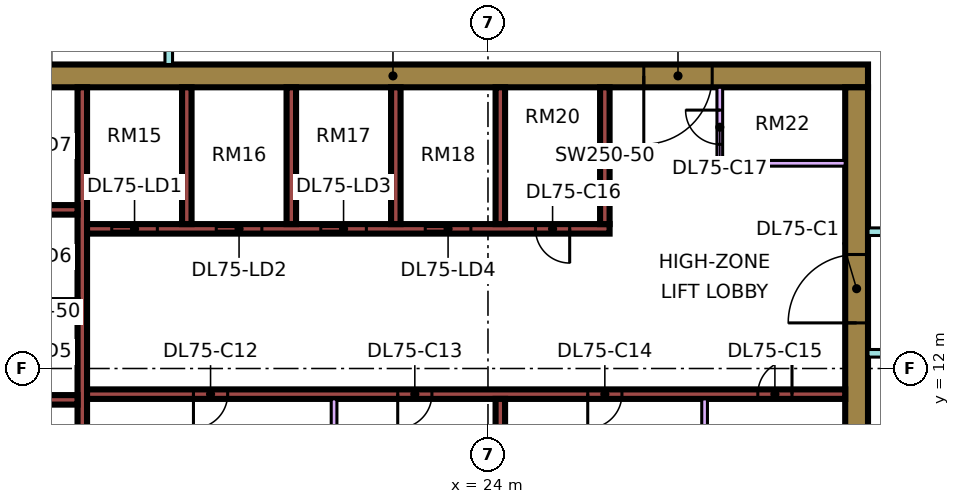
"""IFC4 building model, lengths in metres.
Left out: names, types, materials, properties, quantities, classifications, styles, units other than length and angle.
Written with IfcOpenShell. Run it as: python <this file> out.ifc"""

import sys

from ifc_helpers import new_model, si_unit, direction, frame, frame_2d, origin, place, context, subcontext, project, spatial, rectangle, extrude, element, fill, save


model = new_model("IFC4")
c1 = context("Model", 3, precision=1e-05, world=origin(), true_north=direction((0.0, 1.0)))
c2 = subcontext(c1, "Body", "Model", "MODEL_VIEW")
j1 = project(units=[si_unit("LENGTHUNIT", "METRE"), si_unit("PLANEANGLEUNIT", "RADIAN")], contexts=[c1])
p1 = place(None, origin())
s1 = spatial("IfcSite", under=j1, at=p1, CompositionType="ELEMENT")
p2 = place(p1, origin())
s2 = spatial("IfcBuilding", under=s1, at=p2, CompositionType="ELEMENT")
p3 = place(p2, frame((0.0, 0.0, 318.4)))
s3 = spatial("IfcBuildingStorey", under=s2, at=p3, CompositionType="ELEMENT", Elevation=318.4)
p4 = place(p3, frame((9.0, 19.7, 0.0), z_axis=(0.0, 0.0, 1.0), x_axis=(1.0, 0.0, 0.0)))
e1 = element("IfcWall", 1, at=p4, inside=s3, PredefinedType="SHEAR", context=c2, shape_type="SweptSolid", body=[
    extrude(rectangle(XDim=25.0, YDim=0.6, at=frame_2d((12.5, 0.0))), origin(), (0.0, 0.0, 1.0), 3.75),
])
p5 = place(p4, frame((19.1, 0.0, 0.0)))
e2 = element("IfcOpeningElement", 2, at=p5, cuts=e1, PredefinedType="OPENING", context=c2, shape_type="SweptSolid", body=[
    extrude(rectangle(XDim=1.8, YDim=2.4, at=frame_2d((0.9, 1.2))), frame((0.0, 0.31, 0.0), z_axis=(0.0, -1.0, 0.0), x_axis=(1.0, 0.0, 0.0)), (0.0, 0.0, 1.0), 0.62),
])
p6 = place(p3, frame((33.7, 7.6, 0.0), z_axis=(0.0, 0.0, 1.0), x_axis=(0.0, 1.0, 0.0)))
e3 = element("IfcWall", 3, at=p6, inside=s3, PredefinedType="SHEAR", context=c2, shape_type="SweptSolid", body=[
    extrude(rectangle(XDim=11.8, YDim=0.6, at=frame_2d((5.9, 0.0))), origin(), (0.0, 0.0, 1.0), 3.75),
])
p7 = place(p6, frame((5.6, 0.0, 0.0)))
e4 = element("IfcOpeningElement", 4, at=p7, cuts=e3, PredefinedType="OPENING", context=c2, shape_type="SweptSolid", body=[
    extrude(rectangle(XDim=1.8, YDim=2.4, at=frame_2d((0.9, 1.2))), frame((0.0, 0.31, 0.0), z_axis=(0.0, -1.0, 0.0), x_axis=(1.0, 0.0, 0.0)), (0.0, 0.0, 1.0), 0.62),
])
p8 = place(p3, frame((13.325, 7.6, 0.0), z_axis=(0.0, 0.0, 1.0), x_axis=(0.0, 1.0, 0.0)))
e5 = element("IfcWall", 5, at=p8, inside=s3, PredefinedType="SHEAR", context=c2, shape_type="SweptSolid", body=[
    extrude(rectangle(XDim=11.8, YDim=0.25, at=frame_2d((5.9, 0.0))), origin(), (0.0, 0.0, 1.0), 3.75),
])
p9 = place(p3, frame((13.45, 11.325, 0.0), z_axis=(0.0, 0.0, 1.0), x_axis=(1.0, 0.0, 0.0)))
e6 = element("IfcWall", 6, at=p9, inside=s3, PredefinedType="SHEAR", context=c2, shape_type="SweptSolid", body=[
    extrude(rectangle(XDim=19.95, YDim=0.25, at=frame_2d((9.975, 0.0))), origin(), (0.0, 0.0, 1.0), 3.75),
])
p10 = place(p9, frame((2.8, 0.0, 0.0)))
e7 = element("IfcOpeningElement", 7, at=p10, cuts=e6, PredefinedType="OPENING", context=c2, shape_type="SweptSolid", body=[
    extrude(rectangle(XDim=0.9, YDim=2.1, at=frame_2d((0.45, 1.05))), frame((0.0, 0.135, 0.0), z_axis=(0.0, -1.0, 0.0), x_axis=(1.0, 0.0, 0.0)), (0.0, 0.0, 1.0), 0.27),
])
p11 = place(p9, frame((8.175, 0.0, 0.0)))
e8 = element("IfcOpeningElement", 8, at=p11, cuts=e6, PredefinedType="OPENING", context=c2, shape_type="SweptSolid", body=[
    extrude(rectangle(XDim=0.9, YDim=2.1, at=frame_2d((0.45, 1.05))), frame((0.0, 0.135, 0.0), z_axis=(0.0, -1.0, 0.0), x_axis=(1.0, 0.0, 0.0)), (0.0, 0.0, 1.0), 0.27),
])
p12 = place(p9, frame((13.175, 0.0, 0.0)))
e9 = element("IfcOpeningElement", 9, at=p12, cuts=e6, PredefinedType="OPENING", context=c2, shape_type="SweptSolid", body=[
    extrude(rectangle(XDim=0.9, YDim=2.1, at=frame_2d((0.45, 1.05))), frame((0.0, 0.135, 0.0), z_axis=(0.0, -1.0, 0.0), x_axis=(1.0, 0.0, 0.0)), (0.0, 0.0, 1.0), 0.27),
])
p13 = place(p9, frame((17.65, 0.0, 0.0)))
e10 = element("IfcOpeningElement", 10, at=p13, cuts=e6, PredefinedType="OPENING", context=c2, shape_type="SweptSolid", body=[
    extrude(rectangle(XDim=0.9, YDim=2.1, at=frame_2d((0.45, 1.05))), frame((0.0, 0.135, 0.0), z_axis=(0.0, -1.0, 0.0), x_axis=(1.0, 0.0, 0.0)), (0.0, 0.0, 1.0), 0.27),
])
p14 = place(p3, frame((13.45, 15.675, 0.0), z_axis=(0.0, 0.0, 1.0), x_axis=(1.0, 0.0, 0.0)))
e11 = element("IfcWall", 11, at=p14, inside=s3, PredefinedType="SHEAR", context=c2, shape_type="SweptSolid", body=[
    extrude(rectangle(XDim=13.75, YDim=0.25, at=frame_2d((6.875, 0.0))), origin(), (0.0, 0.0, 1.0), 3.75),
])
p15 = place(p14, frame((0.65, 0.0, 0.0)))
e12 = element("IfcOpeningElement", 12, at=p15, cuts=e11, PredefinedType="OPENING", context=c2, shape_type="SweptSolid", body=[
    extrude(rectangle(XDim=1.2, YDim=2.2, at=frame_2d((0.6, 1.1))), frame((0.0, 0.135, 0.0), z_axis=(0.0, -1.0, 0.0), x_axis=(1.0, 0.0, 0.0)), (0.0, 0.0, 1.0), 0.27),
])
p16 = place(p14, frame((3.4, 0.0, 0.0)))
e13 = element("IfcOpeningElement", 13, at=p16, cuts=e11, PredefinedType="OPENING", context=c2, shape_type="SweptSolid", body=[
    extrude(rectangle(XDim=1.2, YDim=2.2, at=frame_2d((0.6, 1.1))), frame((0.0, 0.135, 0.0), z_axis=(0.0, -1.0, 0.0), x_axis=(1.0, 0.0, 0.0)), (0.0, 0.0, 1.0), 0.27),
])
p17 = place(p14, frame((6.15, 0.0, 0.0)))
e14 = element("IfcOpeningElement", 14, at=p17, cuts=e11, PredefinedType="OPENING", context=c2, shape_type="SweptSolid", body=[
    extrude(rectangle(XDim=1.2, YDim=2.2, at=frame_2d((0.6, 1.1))), frame((0.0, 0.135, 0.0), z_axis=(0.0, -1.0, 0.0), x_axis=(1.0, 0.0, 0.0)), (0.0, 0.0, 1.0), 0.27),
])
p18 = place(p14, frame((8.9, 0.0, 0.0)))
e15 = element("IfcOpeningElement", 15, at=p18, cuts=e11, PredefinedType="OPENING", context=c2, shape_type="SweptSolid", body=[
    extrude(rectangle(XDim=1.2, YDim=2.2, at=frame_2d((0.6, 1.1))), frame((0.0, 0.135, 0.0), z_axis=(0.0, -1.0, 0.0), x_axis=(1.0, 0.0, 0.0)), (0.0, 0.0, 1.0), 0.27),
])
p19 = place(p14, frame((11.8, 0.0, 0.0)))
e16 = element("IfcOpeningElement", 16, at=p19, cuts=e11, PredefinedType="OPENING", context=c2, shape_type="SweptSolid", body=[
    extrude(rectangle(XDim=0.9, YDim=2.1, at=frame_2d((0.45, 1.05))), frame((0.0, 0.135, 0.0), z_axis=(0.0, -1.0, 0.0), x_axis=(1.0, 0.0, 0.0)), (0.0, 0.0, 1.0), 0.27),
])
for number, where, z_axis, x_axis in (
    (17, (10.2, 11.175, 0.0), (0.0, 0.0, 1.0), (1.0, 0.0, 0.0)),
    (18, (10.2, 13.675, 0.0), (0.0, 0.0, 1.0), (1.0, 0.0, 0.0)),
    (19, (10.2, 16.175, 0.0), (0.0, 0.0, 1.0), (1.0, 0.0, 0.0)),
):
    element("IfcWall", number, at=place(p3, frame(where, z_axis=z_axis, x_axis=x_axis)), inside=s3, PredefinedType="SHEAR", context=c2, shape_type="SweptSolid", body=[
        extrude(rectangle(XDim=3.0, YDim=0.25, at=frame_2d((1.5, 0.0))), origin(), (0.0, 0.0, 1.0), 3.75),
    ])
for number, where, z_axis, x_axis in (
    (20, (24.325, 7.6, 0.0), (0.0, 0.0, 1.0), (0.0, 1.0, 0.0)),
    (21, (16.075, 15.8, 0.0), (0.0, 0.0, 1.0), (0.0, 1.0, 0.0)),
    (22, (18.825, 15.8, 0.0), (0.0, 0.0, 1.0), (0.0, 1.0, 0.0)),
    (23, (21.575, 15.8, 0.0), (0.0, 0.0, 1.0), (0.0, 1.0, 0.0)),
    (24, (24.325, 15.8, 0.0), (0.0, 0.0, 1.0), (0.0, 1.0, 0.0)),
    (25, (27.075, 15.8, 0.0), (0.0, 0.0, 1.0), (0.0, 1.0, 0.0)),
):
    element("IfcWall", number, at=place(p3, frame(where, z_axis=z_axis, x_axis=x_axis)), inside=s3, PredefinedType="SHEAR", context=c2, shape_type="SweptSolid", body=[
        extrude(rectangle(XDim=3.6, YDim=0.25, at=frame_2d((1.8, 0.0))), origin(), (0.0, 0.0, 1.0), 3.75),
    ])
p20 = place(p3, frame((-1.447, 12.553, 0.0), z_axis=(0.0, 0.0, 1.0), x_axis=(0.707106781187, -0.707106781187, 0.0)))
e26 = element("IfcWall", 26, at=p20, inside=s3, PredefinedType="SOLIDWALL", context=c2, shape_type="SweptSolid", body=[
    extrude(rectangle(XDim=19.799, YDim=0.15, at=frame_2d((9.899, 0.0))), origin(), (0.0, 0.0, 1.0), 3.3),
])
p21 = place(p20, frame((2.212, 0.0, 0.45)))
e27 = element("IfcOpeningElement", 27, at=p21, cuts=e26, PredefinedType="OPENING", context=c2, shape_type="SweptSolid", body=[
    extrude(rectangle(XDim=3.0, YDim=2.4, at=frame_2d((1.5, 1.2))), frame((0.0, 0.085, 0.0), z_axis=(0.0, -1.0, 0.0), x_axis=(1.0, 0.0, 0.0)), (0.0, 0.0, 1.0), 0.17),
])
p22 = place(p20, frame((10.216, 0.0, 0.45)))
e28 = element("IfcOpeningElement", 28, at=p22, cuts=e26, PredefinedType="OPENING", context=c2, shape_type="SweptSolid", body=[
    extrude(rectangle(XDim=3.0, YDim=2.4, at=frame_2d((1.5, 1.2))), frame((0.0, 0.085, 0.0), z_axis=(0.0, -1.0, 0.0), x_axis=(1.0, 0.0, 0.0)), (0.0, 0.0, 1.0), 0.17),
])
for number, where, z_axis, x_axis in (
    (29, (19.95, 7.6, 0.0), (0.0, 0.0, 1.0), (0.0, 1.0, 0.0)),
    (30, (29.7, 7.6, 0.0), (0.0, 0.0, 1.0), (0.0, 1.0, 0.0)),
):
    element("IfcWall", number, at=place(p3, frame(where, z_axis=z_axis, x_axis=x_axis)), inside=s3, PredefinedType="PARTITIONING", context=c2, shape_type="SweptSolid", body=[
        extrude(rectangle(XDim=3.6, YDim=0.15, at=frame_2d((1.8, 0.0))), origin(), (0.0, 0.0, 1.0), 3.3),
    ])
p23 = place(p3, frame((30.1, 17.4, 0.0), z_axis=(0.0, 0.0, 1.0), x_axis=(0.0, 1.0, 0.0)))
e31 = element("IfcWall", 31, at=p23, inside=s3, PredefinedType="PARTITIONING", context=c2, shape_type="SweptSolid", body=[
    extrude(rectangle(XDim=2.0, YDim=0.15, at=frame_2d((1.0, 0.0))), origin(), (0.0, 0.0, 1.0), 3.3),
])
p24 = place(p23, frame((0.5, 0.0, 0.0)))
e32 = element("IfcOpeningElement", 32, at=p24, cuts=e31, PredefinedType="OPENING", context=c2, shape_type="SweptSolid", body=[
    extrude(rectangle(XDim=0.9, YDim=2.1, at=frame_2d((0.45, 1.05))), frame((0.0, 0.085, 0.0), z_axis=(0.0, -1.0, 0.0), x_axis=(1.0, 0.0, 0.0)), (0.0, 0.0, 1.0), 0.17),
])
p25 = place(p3, frame((30.1, 17.4, 0.0), z_axis=(0.0, 0.0, 1.0), x_axis=(1.0, 0.0, 0.0)))
e33 = element("IfcWall", 33, at=p25, inside=s3, PredefinedType="PARTITIONING", context=c2, shape_type="SweptSolid", body=[
    extrude(rectangle(XDim=3.3, YDim=0.15, at=frame_2d((1.65, 0.0))), origin(), (0.0, 0.0, 1.0), 3.3),
])
p26 = place(p3, frame((15.6, 20.0, 0.0), z_axis=(0.0, 0.0, 1.0), x_axis=(0.0, 1.0, 0.0)))
e34 = element("IfcWall", 34, at=p26, inside=s3, PredefinedType="PARTITIONING", context=c2, shape_type="SweptSolid", body=[
    extrude(rectangle(XDim=27.775, YDim=0.2, at=frame_2d((13.887, 0.0))), origin(), (0.0, 0.0, 1.0), 3.3),
])
p27 = place(p26, frame((6.7, 0.0, 0.0)))
e35 = element("IfcOpeningElement", 35, at=p27, cuts=e34, PredefinedType="OPENING", context=c2, shape_type="SweptSolid", body=[
    extrude(rectangle(XDim=1.6, YDim=2.1, at=frame_2d((0.8, 1.05))), frame((0.0, 0.11, 0.0), z_axis=(0.0, -1.0, 0.0), x_axis=(1.0, 0.0, 0.0)), (0.0, 0.0, 1.0), 0.22),
])
p28 = place(p26, frame((12.95, 0.0, 0.0)))
e36 = element("IfcOpeningElement", 36, at=p28, cuts=e34, PredefinedType="OPENING", context=c2, shape_type="SweptSolid", body=[
    extrude(rectangle(XDim=1.0, YDim=2.1, at=frame_2d((0.5, 1.05))), frame((0.0, 0.11, 0.0), z_axis=(0.0, -1.0, 0.0), x_axis=(1.0, 0.0, 0.0)), (0.0, 0.0, 1.0), 0.22),
])
p29 = place(p26, frame((16.75, 0.0, 0.0)))
e37 = element("IfcOpeningElement", 37, at=p29, cuts=e34, PredefinedType="OPENING", context=c2, shape_type="SweptSolid", body=[
    extrude(rectangle(XDim=1.0, YDim=2.1, at=frame_2d((0.5, 1.05))), frame((0.0, 0.11, 0.0), z_axis=(0.0, -1.0, 0.0), x_axis=(1.0, 0.0, 0.0)), (0.0, 0.0, 1.0), 0.22),
])
p30 = place(p26, frame((1.15, 0.0, 0.0)))
e38 = element("IfcOpeningElement", 38, at=p30, cuts=e34, PredefinedType="OPENING", context=c2, shape_type="SweptSolid", body=[
    extrude(rectangle(XDim=1.8, YDim=2.1, at=frame_2d((0.9, 1.05))), frame((0.0, 0.11, 0.0), z_axis=(0.0, -1.0, 0.0), x_axis=(1.0, 0.0, 0.0)), (0.0, 0.0, 1.0), 0.22),
])
p31 = place(p26, frame((25.9, 0.0, 0.0)))
e39 = element("IfcOpeningElement", 39, at=p31, cuts=e34, PredefinedType="OPENING", context=c2, shape_type="SweptSolid", body=[
    extrude(rectangle(XDim=1.0, YDim=2.1, at=frame_2d((0.5, 1.05))), frame((0.0, 0.11, 0.0), z_axis=(0.0, -1.0, 0.0), x_axis=(1.0, 0.0, 0.0)), (0.0, 0.0, 1.0), 0.22),
])
p32 = place(p3, frame((34.0, 12.4, 0.0), z_axis=(0.0, 0.0, 1.0), x_axis=(1.0, 0.0, 0.0)))
e40 = element("IfcWall", 40, at=p32, inside=s3, PredefinedType="PARTITIONING", context=c2, shape_type="SweptSolid", body=[
    extrude(rectangle(XDim=2.401, YDim=0.2, at=frame_2d((1.2, 0.0))), origin(), (0.0, 0.0, 1.0), 3.3),
])
p33 = place(p3, frame((34.0, 15.6, 0.0), z_axis=(0.0, 0.0, 1.0), x_axis=(1.0, 0.0, 0.0)))
e41 = element("IfcWall", 41, at=p33, inside=s3, PredefinedType="PARTITIONING", context=c2, shape_type="SweptSolid", body=[
    extrude(rectangle(XDim=10.35, YDim=0.2, at=frame_2d((5.175, 0.0))), origin(), (0.0, 0.0, 1.0), 3.3),
])
p34 = place(p33, frame((5.6, 0.0, 0.0)))
e42 = element("IfcOpeningElement", 42, at=p34, cuts=e41, PredefinedType="OPENING", context=c2, shape_type="SweptSolid", body=[
    extrude(rectangle(XDim=1.0, YDim=2.1, at=frame_2d((0.5, 1.05))), frame((0.0, 0.11, 0.0), z_axis=(0.0, -1.0, 0.0), x_axis=(1.0, 0.0, 0.0)), (0.0, 0.0, 1.0), 0.22),
])
p35 = place(p33, frame((0.45, 0.0, 0.0)))
e43 = element("IfcOpeningElement", 43, at=p35, cuts=e41, PredefinedType="OPENING", context=c2, shape_type="SweptSolid", body=[
    extrude(rectangle(XDim=1.2, YDim=2.1, at=frame_2d((0.6, 1.05))), frame((0.0, 0.11, 0.0), z_axis=(0.0, -1.0, 0.0), x_axis=(1.0, 0.0, 0.0)), (0.0, 0.0, 1.0), 0.22),
])
p36 = place(p15, origin())
e44 = element("IfcDoor", 44, at=p36, inside=s3, OperationType="DOUBLE_DOOR_SLIDING", PredefinedType="DOOR", context=c2, shape_type="SweptSolid", body=[
    extrude(rectangle(XDim=1.2, YDim=2.2, at=frame_2d((0.6, 1.1))), frame((0.0, 0.025, 0.0), z_axis=(0.0, -1.0, 0.0), x_axis=(1.0, 0.0, 0.0)), (0.0, 0.0, 1.0), 0.05),
])
fill(e12, e44)
p37 = place(p16, origin())
e45 = element("IfcDoor", 45, at=p37, inside=s3, OperationType="DOUBLE_DOOR_SLIDING", PredefinedType="DOOR", context=c2, shape_type="SweptSolid", body=[
    extrude(rectangle(XDim=1.2, YDim=2.2, at=frame_2d((0.6, 1.1))), frame((0.0, 0.025, 0.0), z_axis=(0.0, -1.0, 0.0), x_axis=(1.0, 0.0, 0.0)), (0.0, 0.0, 1.0), 0.05),
])
fill(e13, e45)
p38 = place(p17, origin())
e46 = element("IfcDoor", 46, at=p38, inside=s3, OperationType="DOUBLE_DOOR_SLIDING", PredefinedType="DOOR", context=c2, shape_type="SweptSolid", body=[
    extrude(rectangle(XDim=1.2, YDim=2.2, at=frame_2d((0.6, 1.1))), frame((0.0, 0.025, 0.0), z_axis=(0.0, -1.0, 0.0), x_axis=(1.0, 0.0, 0.0)), (0.0, 0.0, 1.0), 0.05),
])
fill(e14, e46)
p39 = place(p18, origin())
e47 = element("IfcDoor", 47, at=p39, inside=s3, OperationType="DOUBLE_DOOR_SLIDING", PredefinedType="DOOR", context=c2, shape_type="SweptSolid", body=[
    extrude(rectangle(XDim=1.2, YDim=2.2, at=frame_2d((0.6, 1.1))), frame((0.0, 0.025, 0.0), z_axis=(0.0, -1.0, 0.0), x_axis=(1.0, 0.0, 0.0)), (0.0, 0.0, 1.0), 0.05),
])
fill(e15, e47)
p40 = place(p7, origin())
e48 = element("IfcDoor", 48, at=p40, inside=s3, OperationType="DOUBLE_DOOR_SINGLE_SWING", PredefinedType="DOOR", context=c2, shape_type="SweptSolid", body=[
    extrude(rectangle(XDim=1.8, YDim=2.4, at=frame_2d((0.9, 1.2))), frame((0.0, 0.025, 0.0), z_axis=(0.0, -1.0, 0.0), x_axis=(1.0, 0.0, 0.0)), (0.0, 0.0, 1.0), 0.05),
])
fill(e4, e48)
p41 = place(p5, frame((1.8, 0.0, 0.0), z_axis=(0.0, 0.0, 1.0), x_axis=(-1.0, 0.0, 0.0)))
e49 = element("IfcDoor", 49, at=p41, inside=s3, OperationType="DOUBLE_DOOR_SINGLE_SWING", PredefinedType="DOOR", context=c2, shape_type="SweptSolid", body=[
    extrude(rectangle(XDim=1.8, YDim=2.4, at=frame_2d((0.9, 1.2))), frame((0.0, 0.025, 0.0), z_axis=(0.0, -1.0, 0.0), x_axis=(1.0, 0.0, 0.0)), (0.0, 0.0, 1.0), 0.05),
])
fill(e2, e49)
p42 = place(p10, frame((0.9, 0.0, 0.0), z_axis=(0.0, 0.0, 1.0), x_axis=(-1.0, 0.0, 0.0)))
e50 = element("IfcDoor", 50, at=p42, inside=s3, OperationType="SINGLE_SWING_LEFT", PredefinedType="DOOR", context=c2, shape_type="SweptSolid", body=[
    extrude(rectangle(XDim=0.9, YDim=2.1, at=frame_2d((0.45, 1.05))), frame((0.0, 0.025, 0.0), z_axis=(0.0, -1.0, 0.0), x_axis=(1.0, 0.0, 0.0)), (0.0, 0.0, 1.0), 0.05),
])
fill(e7, e50)
p43 = place(p11, frame((0.9, 0.0, 0.0), z_axis=(0.0, 0.0, 1.0), x_axis=(-1.0, 0.0, 0.0)))
e51 = element("IfcDoor", 51, at=p43, inside=s3, OperationType="SINGLE_SWING_LEFT", PredefinedType="DOOR", context=c2, shape_type="SweptSolid", body=[
    extrude(rectangle(XDim=0.9, YDim=2.1, at=frame_2d((0.45, 1.05))), frame((0.0, 0.025, 0.0), z_axis=(0.0, -1.0, 0.0), x_axis=(1.0, 0.0, 0.0)), (0.0, 0.0, 1.0), 0.05),
])
fill(e8, e51)
p44 = place(p12, frame((0.9, 0.0, 0.0), z_axis=(0.0, 0.0, 1.0), x_axis=(-1.0, 0.0, 0.0)))
e52 = element("IfcDoor", 52, at=p44, inside=s3, OperationType="SINGLE_SWING_LEFT", PredefinedType="DOOR", context=c2, shape_type="SweptSolid", body=[
    extrude(rectangle(XDim=0.9, YDim=2.1, at=frame_2d((0.45, 1.05))), frame((0.0, 0.025, 0.0), z_axis=(0.0, -1.0, 0.0), x_axis=(1.0, 0.0, 0.0)), (0.0, 0.0, 1.0), 0.05),
])
fill(e9, e52)
p45 = place(p13, frame((0.9, 0.0, 0.0), z_axis=(0.0, 0.0, 1.0), x_axis=(-1.0, 0.0, 0.0)))
e53 = element("IfcDoor", 53, at=p45, inside=s3, OperationType="SINGLE_SWING_RIGHT", PredefinedType="DOOR", context=c2, shape_type="SweptSolid", body=[
    extrude(rectangle(XDim=0.9, YDim=2.1, at=frame_2d((0.45, 1.05))), frame((0.0, 0.025, 0.0), z_axis=(0.0, -1.0, 0.0), x_axis=(1.0, 0.0, 0.0)), (0.0, 0.0, 1.0), 0.05),
])
fill(e10, e53)
p46 = place(p19, origin())
e54 = element("IfcDoor", 54, at=p46, inside=s3, OperationType="SINGLE_SWING_RIGHT", PredefinedType="DOOR", context=c2, shape_type="SweptSolid", body=[
    extrude(rectangle(XDim=0.9, YDim=2.1, at=frame_2d((0.45, 1.05))), frame((0.0, 0.025, 0.0), z_axis=(0.0, -1.0, 0.0), x_axis=(1.0, 0.0, 0.0)), (0.0, 0.0, 1.0), 0.05),
])
fill(e16, e54)
p47 = place(p24, frame((0.9, 0.0, 0.0), z_axis=(0.0, 0.0, 1.0), x_axis=(-1.0, 0.0, 0.0)))
e55 = element("IfcDoor", 55, at=p47, inside=s3, OperationType="SINGLE_SWING_RIGHT", PredefinedType="DOOR", context=c2, shape_type="SweptSolid", body=[
    extrude(rectangle(XDim=0.9, YDim=2.1, at=frame_2d((0.45, 1.05))), frame((0.0, 0.025, 0.0), z_axis=(0.0, -1.0, 0.0), x_axis=(1.0, 0.0, 0.0)), (0.0, 0.0, 1.0), 0.05),
])
fill(e32, e55)
save(model, sys.argv[1])
